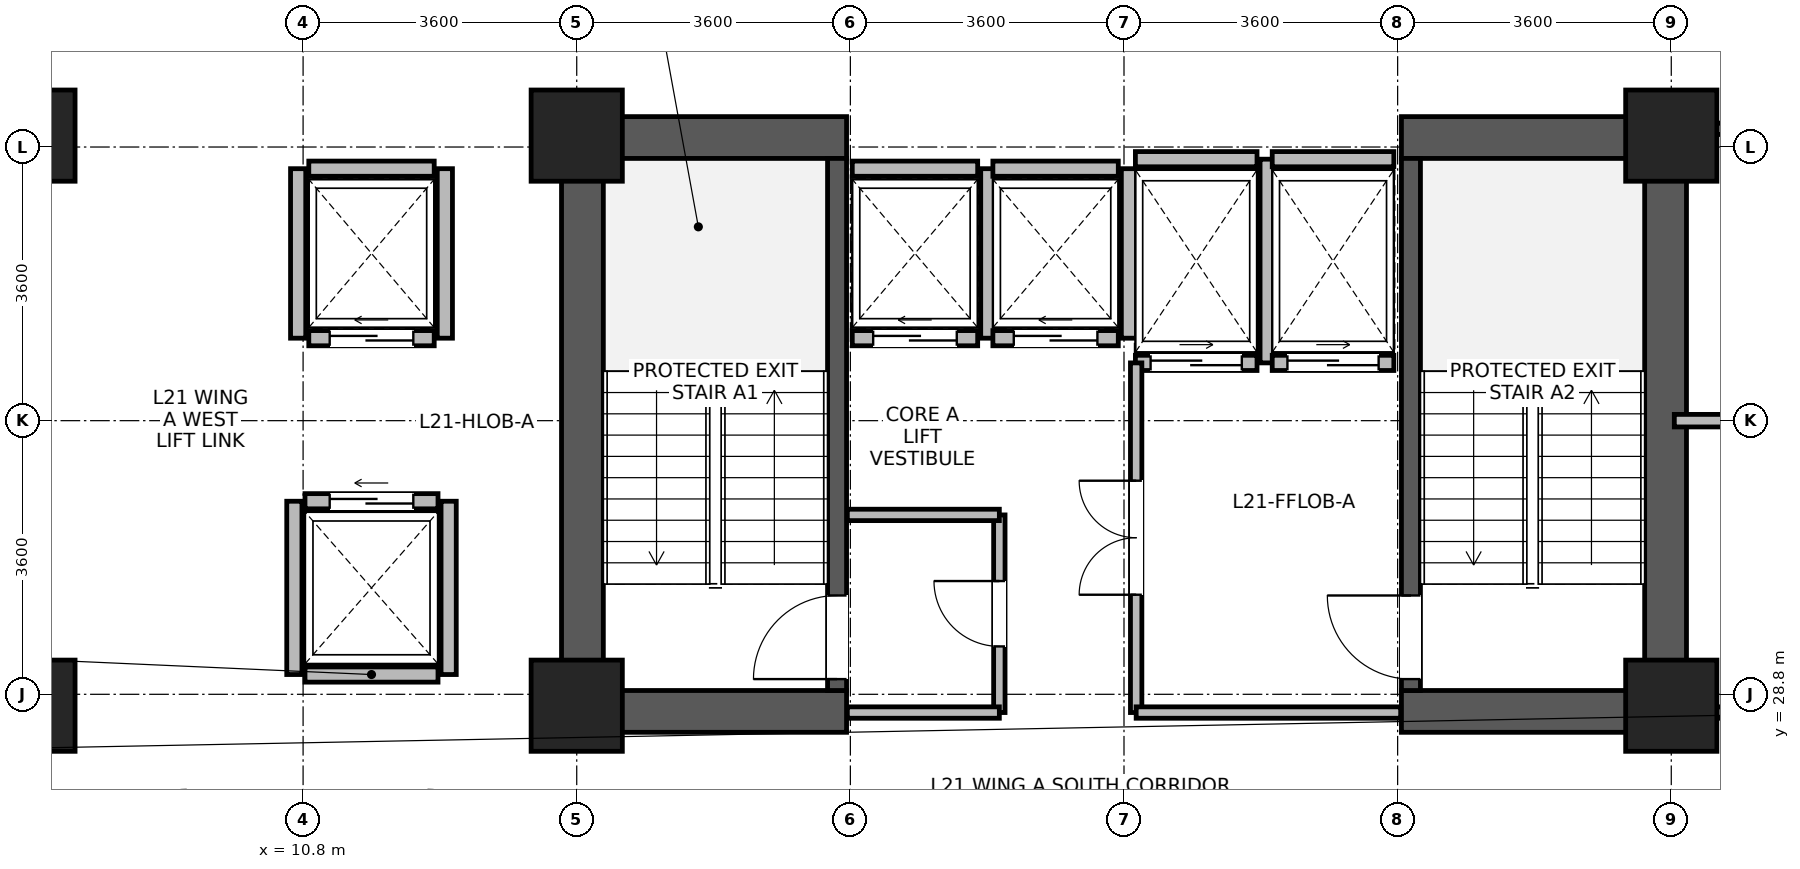
"""IFC4 building model, lengths in metres.
Left out: names, types, materials, properties, quantities, classifications, styles, units other than length and angle.
Written with IfcOpenShell. Run it as: python <this file> out.ifc"""

import sys

from ifc_helpers import new_model, si_unit, direction, frame, frame_2d, origin, origin_2d, place, context, subcontext, project, spatial, rectangle, extrude, source, transform, mapped, element, fill, save


model = new_model("IFC4")
c1 = context("Model", 3, precision=1e-05, world=origin(), true_north=direction((0.0, 1.0)))
c2 = subcontext(c1, "Body", "Model", "MODEL_VIEW")
j1 = project(units=[si_unit("LENGTHUNIT", "METRE"), si_unit("PLANEANGLEUNIT", "RADIAN")], contexts=[c1])
p1 = place(None, origin())
s1 = spatial("IfcSite", under=j1, at=p1, CompositionType="ELEMENT")
p2 = place(p1, origin())
s2 = spatial("IfcBuilding", under=s1, at=p2, CompositionType="ELEMENT")
p3 = place(p2, frame((0.0, 0.0, 86.0)))
s3 = spatial("IfcBuildingStorey", under=s2, at=p3, CompositionType="ELEMENT", Elevation=86.0)
for number, where, z_axis, x_axis in (
    (1, (14.475, 28.3, 0.0), (0.0, 0.0, 1.0), (0.0, 1.0, 0.0)),
    (2, (28.725, 28.3, 0.0), (0.0, 0.0, 1.0), (0.0, 1.0, 0.0)),
):
    element("IfcWall", number, at=place(p3, frame(where, z_axis=z_axis, x_axis=x_axis)), inside=s3, PredefinedType="SHEAR", context=c2, shape_type="SweptSolid", body=[
        extrude(rectangle(XDim=8.1, YDim=0.55, at=frame_2d((4.05, 0.0))), origin(), (0.0, 0.0, 1.0), 3.45),
    ])
for number, where, z_axis, x_axis in (
    (3, (14.75, 28.575, 0.0), (0.0, 0.0, 1.0), (1.0, 0.0, 0.0)),
    (4, (25.25, 28.575, 0.0), (0.0, 0.0, 1.0), (1.0, 0.0, 0.0)),
    (5, (14.75, 36.125, 0.0), (0.0, 0.0, 1.0), (1.0, 0.0, 0.0)),
    (6, (25.25, 36.125, 0.0), (0.0, 0.0, 1.0), (1.0, 0.0, 0.0)),
):
    element("IfcWall", number, at=place(p3, frame(where, z_axis=z_axis, x_axis=x_axis)), inside=s3, PredefinedType="SHEAR", context=c2, shape_type="SweptSolid", body=[
        extrude(rectangle(XDim=3.2, YDim=0.55, at=frame_2d((1.6, 0.0))), origin(), (0.0, 0.0, 1.0), 3.45),
    ])
p4 = place(p3, frame((17.825, 28.85, 0.0), z_axis=(0.0, 0.0, 1.0), x_axis=(0.0, 1.0, 0.0)))
e7 = element("IfcWall", 7, at=p4, inside=s3, PredefinedType="SHEAR", context=c2, shape_type="SweptSolid", body=[
    extrude(rectangle(XDim=7.0, YDim=0.25, at=frame_2d((3.5, 0.0))), origin(), (0.0, 0.0, 1.0), 3.45),
])
p5 = place(p4, frame((0.15, 0.0, 0.0)))
e8 = element("IfcOpeningElement", 8, at=p5, cuts=e7, PredefinedType="OPENING", context=c2, shape_type="SweptSolid", body=[
    extrude(rectangle(XDim=1.1, YDim=2.08, at=frame_2d((0.55, 1.04))), frame((0.0, 0.135, 0.0), z_axis=(0.0, -1.0, 0.0), x_axis=(1.0, 0.0, 0.0)), (0.0, 0.0, 1.0), 0.27),
])
p6 = place(p3, frame((25.375, 28.85, 0.0), z_axis=(0.0, 0.0, 1.0), x_axis=(0.0, 1.0, 0.0)))
e9 = element("IfcWall", 9, at=p6, inside=s3, PredefinedType="SHEAR", context=c2, shape_type="SweptSolid", body=[
    extrude(rectangle(XDim=7.0, YDim=0.25, at=frame_2d((3.5, 0.0))), origin(), (0.0, 0.0, 1.0), 3.45),
])
p7 = place(p6, frame((0.15, 0.0, 0.0)))
e10 = element("IfcOpeningElement", 10, at=p7, cuts=e9, PredefinedType="OPENING", context=c2, shape_type="SweptSolid", body=[
    extrude(rectangle(XDim=1.1, YDim=2.08, at=frame_2d((0.55, 1.04))), frame((0.0, 0.135, 0.0), z_axis=(0.0, -1.0, 0.0), x_axis=(1.0, 0.0, 0.0)), (0.0, 0.0, 1.0), 0.27),
])
m1 = source(origin(), c2, "Body", "SweptSolid", [
    extrude(rectangle(XDim=1.2, YDim=1.2, at=origin_2d()), origin(), (0.0, 0.0, 1.0), 3.7),
])
for number, where, z_axis, x_axis in (
    (11, (7.2, 28.65, 0.0), (0.0, 0.0, 1.0), (1.0, 0.0, 0.0)),
    (12, (7.2, 36.15, 0.0), (0.0, 0.0, 1.0), (1.0, 0.0, 0.0)),
    (13, (14.4, 28.65, 0.0), (0.0, 0.0, 1.0), (1.0, 0.0, 0.0)),
    (14, (14.4, 36.15, 0.0), (0.0, 0.0, 1.0), (1.0, 0.0, 0.0)),
    (15, (28.8, 28.65, 0.0), (0.0, 0.0, 1.0), (1.0, 0.0, 0.0)),
    (16, (28.8, 36.15, 0.0), (0.0, 0.0, 1.0), (1.0, 0.0, 0.0)),
):
    element("IfcColumn", number, at=place(p3, frame(where, z_axis=z_axis, x_axis=x_axis)), inside=s3, PredefinedType="COLUMN", context=c2, shape_type="MappedRepresentation", body=[
        mapped(m1, transform((0.0, 0.0, 0.0), x_axis=(1.0, 0.0, 0.0), y_axis=(0.0, 1.0, 0.0), z_axis=(0.0, 0.0, 1.0), scale=1.0)),
    ])
p8 = place(p3, frame((18.025, 33.485, 0.0), z_axis=(0.0, 0.0, 1.0), x_axis=(1.0, 0.0, 0.0)))
e17 = element("IfcWall", 17, at=p8, inside=s3, PredefinedType="PARTITIONING", context=c2, shape_type="SweptSolid", body=[
    extrude(rectangle(XDim=1.65, YDim=0.2, at=frame_2d((0.825, 0.0))), origin(), (0.0, 0.0, 1.0), 3.43),
])
p9 = place(p8, frame((0.275, 0.0, 0.0)))
e18 = element("IfcOpeningElement", 18, at=p9, cuts=e17, PredefinedType="OPENING", context=c2, shape_type="SweptSolid", body=[
    extrude(rectangle(XDim=1.1, YDim=2.12, at=frame_2d((0.55, 1.06))), frame((0.0, 0.11, 0.0), z_axis=(0.0, -1.0, 0.0), x_axis=(1.0, 0.0, 0.0)), (0.0, 0.0, 1.0), 0.22),
])
p10 = place(p3, frame((18.025, 35.715, 0.0), z_axis=(0.0, 0.0, 1.0), x_axis=(1.0, 0.0, 0.0)))
e19 = element("IfcWall", 19, at=p10, inside=s3, PredefinedType="PARTITIONING", context=c2, shape_type="SweptSolid", body=[
    extrude(rectangle(XDim=1.65, YDim=0.2, at=frame_2d((0.825, 0.0))), origin(), (0.0, 0.0, 1.0), 2.23),
])
p11 = place(p3, frame((19.815, 33.485, 0.0), z_axis=(0.0, 0.0, 1.0), x_axis=(0.0, 1.0, 0.0)))
e20 = element("IfcWall", 20, at=p11, inside=s3, PredefinedType="PARTITIONING", context=c2, shape_type="SweptSolid", body=[
    extrude(rectangle(XDim=2.23, YDim=0.2, at=frame_2d((1.115, 0.0))), origin(), (0.0, 0.0, 1.0), 3.43),
])
p12 = place(p3, frame((19.875, 33.485, 0.0), z_axis=(0.0, 0.0, 1.0), x_axis=(1.0, 0.0, 0.0)))
e21 = element("IfcWall", 21, at=p12, inside=s3, PredefinedType="PARTITIONING", context=c2, shape_type="SweptSolid", body=[
    extrude(rectangle(XDim=1.65, YDim=0.2, at=frame_2d((0.825, 0.0))), origin(), (0.0, 0.0, 1.0), 3.43),
])
p13 = place(p12, frame((0.275, 0.0, 0.0)))
e22 = element("IfcOpeningElement", 22, at=p13, cuts=e21, PredefinedType="OPENING", context=c2, shape_type="SweptSolid", body=[
    extrude(rectangle(XDim=1.1, YDim=2.12, at=frame_2d((0.55, 1.06))), frame((0.0, 0.11, 0.0), z_axis=(0.0, -1.0, 0.0), x_axis=(1.0, 0.0, 0.0)), (0.0, 0.0, 1.0), 0.22),
])
p14 = place(p3, frame((19.875, 35.715, 0.0), z_axis=(0.0, 0.0, 1.0), x_axis=(1.0, 0.0, 0.0)))
e23 = element("IfcWall", 23, at=p14, inside=s3, PredefinedType="PARTITIONING", context=c2, shape_type="SweptSolid", body=[
    extrude(rectangle(XDim=1.65, YDim=0.2, at=frame_2d((0.825, 0.0))), origin(), (0.0, 0.0, 1.0), 2.23),
])
p15 = place(p3, frame((21.665, 33.485, 0.0), z_axis=(0.0, 0.0, 1.0), x_axis=(0.0, 1.0, 0.0)))
e24 = element("IfcWall", 24, at=p15, inside=s3, PredefinedType="PARTITIONING", context=c2, shape_type="SweptSolid", body=[
    extrude(rectangle(XDim=2.23, YDim=0.2, at=frame_2d((1.115, 0.0))), origin(), (0.0, 0.0, 1.0), 3.43),
])
p16 = place(p3, frame((10.825, 29.06, 0.0), z_axis=(0.0, 0.0, 1.0), x_axis=(1.0, 0.0, 0.0)))
e25 = element("IfcWall", 25, at=p16, inside=s3, PredefinedType="PARTITIONING", context=c2, shape_type="SweptSolid", body=[
    extrude(rectangle(XDim=1.75, YDim=0.2, at=frame_2d((0.875, 0.0))), origin(), (0.0, 0.0, 1.0), 3.43),
])
p17 = place(p3, frame((10.825, 31.34, 0.0), z_axis=(0.0, 0.0, 1.0), x_axis=(1.0, 0.0, 0.0)))
e26 = element("IfcWall", 26, at=p17, inside=s3, PredefinedType="PARTITIONING", context=c2, shape_type="SweptSolid", body=[
    extrude(rectangle(XDim=1.75, YDim=0.2, at=frame_2d((0.875, 0.0))), origin(), (0.0, 0.0, 1.0), 3.43),
])
p18 = place(p17, frame((0.325, 0.0, 0.0)))
e27 = element("IfcOpeningElement", 27, at=p18, cuts=e26, PredefinedType="OPENING", context=c2, shape_type="SweptSolid", body=[
    extrude(rectangle(XDim=1.1, YDim=2.12, at=frame_2d((0.55, 1.06))), frame((0.0, 0.11, 0.0), z_axis=(0.0, -1.0, 0.0), x_axis=(1.0, 0.0, 0.0)), (0.0, 0.0, 1.0), 0.22),
])
for number, where, z_axis, x_axis in (
    (28, (10.685, 29.06, 0.0), (0.0, 0.0, 1.0), (0.0, 1.0, 0.0)),
    (29, (12.715, 29.06, 0.0), (0.0, 0.0, 1.0), (0.0, 1.0, 0.0)),
):
    element("IfcWall", number, at=place(p3, frame(where, z_axis=z_axis, x_axis=x_axis)), inside=s3, PredefinedType="PARTITIONING", context=c2, shape_type="SweptSolid", body=[
        extrude(rectangle(XDim=2.28, YDim=0.2, at=frame_2d((1.14, 0.0))), origin(), (0.0, 0.0, 1.0), 3.43),
    ])
p19 = place(p3, frame((10.875, 33.485, 0.0), z_axis=(0.0, 0.0, 1.0), x_axis=(1.0, 0.0, 0.0)))
e30 = element("IfcWall", 30, at=p19, inside=s3, PredefinedType="PARTITIONING", context=c2, shape_type="SweptSolid", body=[
    extrude(rectangle(XDim=1.65, YDim=0.2, at=frame_2d((0.825, 0.0))), origin(), (0.0, 0.0, 1.0), 3.43),
])
p20 = place(p19, frame((0.275, 0.0, 0.0)))
e31 = element("IfcOpeningElement", 31, at=p20, cuts=e30, PredefinedType="OPENING", context=c2, shape_type="SweptSolid", body=[
    extrude(rectangle(XDim=1.1, YDim=2.12, at=frame_2d((0.55, 1.06))), frame((0.0, 0.11, 0.0), z_axis=(0.0, -1.0, 0.0), x_axis=(1.0, 0.0, 0.0)), (0.0, 0.0, 1.0), 0.22),
])
p21 = place(p3, frame((10.875, 35.715, 0.0), z_axis=(0.0, 0.0, 1.0), x_axis=(1.0, 0.0, 0.0)))
e32 = element("IfcWall", 32, at=p21, inside=s3, PredefinedType="PARTITIONING", context=c2, shape_type="SweptSolid", body=[
    extrude(rectangle(XDim=1.65, YDim=0.2, at=frame_2d((0.825, 0.0))), origin(), (0.0, 0.0, 1.0), 3.43),
])
for number, where, z_axis, x_axis in (
    (33, (10.735, 33.485, 0.0), (0.0, 0.0, 1.0), (0.0, 1.0, 0.0)),
    (34, (12.665, 33.485, 0.0), (0.0, 0.0, 1.0), (0.0, 1.0, 0.0)),
):
    element("IfcWall", number, at=place(p3, frame(where, z_axis=z_axis, x_axis=x_axis)), inside=s3, PredefinedType="PARTITIONING", context=c2, shape_type="SweptSolid", body=[
        extrude(rectangle(XDim=2.23, YDim=0.2, at=frame_2d((1.115, 0.0))), origin(), (0.0, 0.0, 1.0), 3.43),
    ])
p22 = place(p3, frame((21.75, 33.16, 0.0), z_axis=(0.0, 0.0, 1.0), x_axis=(1.0, 0.0, 0.0)))
e35 = element("IfcWall", 35, at=p22, inside=s3, PredefinedType="PARTITIONING", context=c2, shape_type="SweptSolid", body=[
    extrude(rectangle(XDim=1.6, YDim=0.2, at=frame_2d((0.8, 0.0))), origin(), (0.0, 0.0, 1.0), 3.43),
])
p23 = place(p22, frame((0.2, 0.0, 0.0)))
e36 = element("IfcOpeningElement", 36, at=p23, cuts=e35, PredefinedType="OPENING", context=c2, shape_type="SweptSolid", body=[
    extrude(rectangle(XDim=1.2, YDim=2.12, at=frame_2d((0.6, 1.06))), frame((0.0, 0.11, 0.0), z_axis=(0.0, -1.0, 0.0), x_axis=(1.0, 0.0, 0.0)), (0.0, 0.0, 1.0), 0.22),
])
p24 = place(p3, frame((21.75, 35.84, 0.0), z_axis=(0.0, 0.0, 1.0), x_axis=(1.0, 0.0, 0.0)))
e37 = element("IfcWall", 37, at=p24, inside=s3, PredefinedType="PARTITIONING", context=c2, shape_type="SweptSolid", body=[
    extrude(rectangle(XDim=1.6, YDim=0.2, at=frame_2d((0.8, 0.0))), origin(), (0.0, 0.0, 1.0), 2.23),
])
p25 = place(p3, frame((23.49, 33.16, 0.0), z_axis=(0.0, 0.0, 1.0), x_axis=(0.0, 1.0, 0.0)))
e38 = element("IfcWall", 38, at=p25, inside=s3, PredefinedType="PARTITIONING", context=c2, shape_type="SweptSolid", body=[
    extrude(rectangle(XDim=2.68, YDim=0.2, at=frame_2d((1.34, 0.0))), origin(), (0.0, 0.0, 1.0), 3.43),
])
p26 = place(p3, frame((23.55, 33.16, 0.0), z_axis=(0.0, 0.0, 1.0), x_axis=(1.0, 0.0, 0.0)))
e39 = element("IfcWall", 39, at=p26, inside=s3, PredefinedType="PARTITIONING", context=c2, shape_type="SweptSolid", body=[
    extrude(rectangle(XDim=1.6, YDim=0.2, at=frame_2d((0.8, 0.0))), origin(), (0.0, 0.0, 1.0), 3.43),
])
p27 = place(p26, frame((0.2, 0.0, 0.0)))
e40 = element("IfcOpeningElement", 40, at=p27, cuts=e39, PredefinedType="OPENING", context=c2, shape_type="SweptSolid", body=[
    extrude(rectangle(XDim=1.2, YDim=2.12, at=frame_2d((0.6, 1.06))), frame((0.0, 0.11, 0.0), z_axis=(0.0, -1.0, 0.0), x_axis=(1.0, 0.0, 0.0)), (0.0, 0.0, 1.0), 0.22),
])
p28 = place(p3, frame((23.55, 35.84, 0.0), z_axis=(0.0, 0.0, 1.0), x_axis=(1.0, 0.0, 0.0)))
e41 = element("IfcWall", 41, at=p28, inside=s3, PredefinedType="PARTITIONING", context=c2, shape_type="SweptSolid", body=[
    extrude(rectangle(XDim=1.6, YDim=0.2, at=frame_2d((0.8, 0.0))), origin(), (0.0, 0.0, 1.0), 2.23),
])
p29 = place(p3, frame((29.4, 28.56, 0.0), z_axis=(0.0, 0.0, 1.0), x_axis=(1.0, 0.0, 0.0)))
e42 = element("IfcWall", 42, at=p29, inside=s3, PredefinedType="PARTITIONING", context=c2, shape_type="SweptSolid", body=[
    extrude(rectangle(XDim=3.96, YDim=0.15, at=frame_2d((1.98, 0.0))), origin(), (0.0, 0.0, 1.0), 2.78),
])
p30 = place(p29, frame((1.55, 0.0, 0.0)))
e43 = element("IfcOpeningElement", 43, at=p30, cuts=e42, PredefinedType="OPENING", context=c2, shape_type="SweptSolid", body=[
    extrude(rectangle(XDim=0.86, YDim=2.02, at=frame_2d((0.43, 1.01))), frame((0.0, 0.085, 0.0), z_axis=(0.0, -1.0, 0.0), x_axis=(1.0, 0.0, 0.0)), (0.0, 0.0, 1.0), 0.17),
])
p31 = place(p3, frame((29.4, 36.24, 0.0), z_axis=(0.0, 0.0, 1.0), x_axis=(1.0, 0.0, 0.0)))
e44 = element("IfcWall", 44, at=p31, inside=s3, PredefinedType="PARTITIONING", context=c2, shape_type="SweptSolid", body=[
    extrude(rectangle(XDim=3.96, YDim=0.15, at=frame_2d((1.98, 0.0))), origin(), (0.0, 0.0, 1.0), 2.78),
])
p32 = place(p31, frame((1.33, 0.0, 0.0)))
e45 = element("IfcOpeningElement", 45, at=p32, cuts=e44, PredefinedType="OPENING", context=c2, shape_type="SweptSolid", body=[
    extrude(rectangle(XDim=1.3, YDim=2.12, at=frame_2d((0.65, 1.06))), frame((0.0, 0.085, 0.0), z_axis=(0.0, -1.0, 0.0), x_axis=(1.0, 0.0, 0.0)), (0.0, 0.0, 1.0), 0.17),
])
p33 = place(p3, frame((19.96, 28.56, 0.0), z_axis=(0.0, 0.0, 1.0), x_axis=(0.0, 1.0, 0.0)))
e46 = element("IfcWall", 46, at=p33, inside=s3, PredefinedType="PARTITIONING", context=c2, shape_type="SweptSolid", body=[
    extrude(rectangle(XDim=2.6, YDim=0.15, at=frame_2d((1.3, 0.0))), origin(), (0.0, 0.0, 1.0), 3.43),
])
p34 = place(p33, frame((0.87, 0.0, 0.0)))
e47 = element("IfcOpeningElement", 47, at=p34, cuts=e46, PredefinedType="OPENING", context=c2, shape_type="SweptSolid", body=[
    extrude(rectangle(XDim=0.86, YDim=2.02, at=frame_2d((0.43, 1.01))), frame((0.0, 0.085, 0.0), z_axis=(0.0, -1.0, 0.0), x_axis=(1.0, 0.0, 0.0)), (0.0, 0.0, 1.0), 0.17),
])
p35 = place(p3, frame((17.96, 28.56, 0.0), z_axis=(0.0, 0.0, 1.0), x_axis=(1.0, 0.0, 0.0)))
e48 = element("IfcWall", 48, at=p35, inside=s3, PredefinedType="PARTITIONING", context=c2, shape_type="SweptSolid", body=[
    extrude(rectangle(XDim=2.0, YDim=0.15, at=frame_2d((1.0, 0.0))), origin(), (0.0, 0.0, 1.0), 2.23),
])
p36 = place(p3, frame((17.96, 31.16, 0.0), z_axis=(0.0, 0.0, 1.0), x_axis=(1.0, 0.0, 0.0)))
e49 = element("IfcWall", 49, at=p36, inside=s3, PredefinedType="PARTITIONING", context=c2, shape_type="SweptSolid", body=[
    extrude(rectangle(XDim=2.0, YDim=0.15, at=frame_2d((1.0, 0.0))), origin(), (0.0, 0.0, 1.0), 3.43),
])
p37 = place(p3, frame((21.76, 28.56, 0.0), z_axis=(0.0, 0.0, 1.0), x_axis=(0.0, 1.0, 0.0)))
e50 = element("IfcWall", 50, at=p37, inside=s3, PredefinedType="PARTITIONING", context=c2, shape_type="SweptSolid", body=[
    extrude(rectangle(XDim=4.6, YDim=0.15, at=frame_2d((2.3, 0.0))), origin(), (0.0, 0.0, 1.0), 3.43),
])
p38 = place(p37, frame((1.55, 0.0, 0.0)))
e51 = element("IfcOpeningElement", 51, at=p38, cuts=e50, PredefinedType="OPENING", context=c2, shape_type="SweptSolid", body=[
    extrude(rectangle(XDim=1.5, YDim=2.1, at=frame_2d((0.75, 1.05))), frame((0.0, 0.085, 0.0), z_axis=(0.0, -1.0, 0.0), x_axis=(1.0, 0.0, 0.0)), (0.0, 0.0, 1.0), 0.17),
])
p39 = place(p3, frame((28.84, 32.4, 0.0), z_axis=(0.0, 0.0, 1.0), x_axis=(1.0, 0.0, 0.0)))
e52 = element("IfcWall", 52, at=p39, inside=s3, PredefinedType="PARTITIONING", context=c2, shape_type="SweptSolid", body=[
    extrude(rectangle(XDim=4.52, YDim=0.165, at=frame_2d((2.26, 0.0))), origin(), (0.0, 0.0, 1.0), 3.43),
])
p40 = place(p3, frame((21.76, 28.56, 0.0), z_axis=(0.0, 0.0, 1.0), x_axis=(1.0, 0.0, 0.0)))
e53 = element("IfcWall", 53, at=p40, inside=s3, PredefinedType="PARTITIONING", context=c2, shape_type="SweptSolid", body=[
    extrude(rectangle(XDim=3.48, YDim=0.15, at=frame_2d((1.74, 0.0))), origin(), (0.0, 0.0, 1.0), 2.23),
])
p41 = place(p5, origin())
e54 = element("IfcDoor", 54, at=p41, inside=s3, OperationType="SINGLE_SWING_LEFT", PredefinedType="DOOR", context=c2, shape_type="SweptSolid", body=[
    extrude(rectangle(XDim=1.1, YDim=2.08, at=frame_2d((0.55, 1.04))), frame((0.0, 0.025, 0.0), z_axis=(0.0, -1.0, 0.0), x_axis=(1.0, 0.0, 0.0)), (0.0, 0.0, 1.0), 0.05),
])
fill(e8, e54)
p42 = place(p7, origin())
e55 = element("IfcDoor", 55, at=p42, inside=s3, OperationType="SINGLE_SWING_RIGHT", PredefinedType="DOOR", context=c2, shape_type="SweptSolid", body=[
    extrude(rectangle(XDim=1.1, YDim=2.08, at=frame_2d((0.55, 1.04))), frame((0.0, 0.025, 0.0), z_axis=(0.0, -1.0, 0.0), x_axis=(1.0, 0.0, 0.0)), (0.0, 0.0, 1.0), 0.05),
])
fill(e10, e55)
p43 = place(p9, origin())
e56 = element("IfcDoor", 56, at=p43, inside=s3, OperationType="SLIDING_TO_LEFT", PredefinedType="DOOR", context=c2, shape_type="SweptSolid", body=[
    extrude(rectangle(XDim=1.1, YDim=2.12, at=frame_2d((0.55, 1.06))), frame((0.0, 0.025, 0.0), z_axis=(0.0, -1.0, 0.0), x_axis=(1.0, 0.0, 0.0)), (0.0, 0.0, 1.0), 0.05),
])
fill(e18, e56)
p44 = place(p13, origin())
e57 = element("IfcDoor", 57, at=p44, inside=s3, OperationType="SLIDING_TO_LEFT", PredefinedType="DOOR", context=c2, shape_type="SweptSolid", body=[
    extrude(rectangle(XDim=1.1, YDim=2.12, at=frame_2d((0.55, 1.06))), frame((0.0, 0.025, 0.0), z_axis=(0.0, -1.0, 0.0), x_axis=(1.0, 0.0, 0.0)), (0.0, 0.0, 1.0), 0.05),
])
fill(e22, e57)
p45 = place(p18, origin())
e58 = element("IfcDoor", 58, at=p45, inside=s3, OperationType="SLIDING_TO_LEFT", PredefinedType="DOOR", context=c2, shape_type="SweptSolid", body=[
    extrude(rectangle(XDim=1.1, YDim=2.12, at=frame_2d((0.55, 1.06))), frame((0.0, 0.025, 0.0), z_axis=(0.0, -1.0, 0.0), x_axis=(1.0, 0.0, 0.0)), (0.0, 0.0, 1.0), 0.05),
])
fill(e27, e58)
p46 = place(p20, origin())
e59 = element("IfcDoor", 59, at=p46, inside=s3, OperationType="SLIDING_TO_LEFT", PredefinedType="DOOR", context=c2, shape_type="SweptSolid", body=[
    extrude(rectangle(XDim=1.1, YDim=2.12, at=frame_2d((0.55, 1.06))), frame((0.0, 0.025, 0.0), z_axis=(0.0, -1.0, 0.0), x_axis=(1.0, 0.0, 0.0)), (0.0, 0.0, 1.0), 0.05),
])
fill(e31, e59)
p47 = place(p23, origin())
e60 = element("IfcDoor", 60, at=p47, inside=s3, OperationType="SLIDING_TO_RIGHT", PredefinedType="DOOR", context=c2, shape_type="SweptSolid", body=[
    extrude(rectangle(XDim=1.2, YDim=2.12, at=frame_2d((0.6, 1.06))), frame((0.0, 0.025, 0.0), z_axis=(0.0, -1.0, 0.0), x_axis=(1.0, 0.0, 0.0)), (0.0, 0.0, 1.0), 0.05),
])
fill(e36, e60)
p48 = place(p27, origin())
e61 = element("IfcDoor", 61, at=p48, inside=s3, OperationType="SLIDING_TO_RIGHT", PredefinedType="DOOR", context=c2, shape_type="SweptSolid", body=[
    extrude(rectangle(XDim=1.2, YDim=2.12, at=frame_2d((0.6, 1.06))), frame((0.0, 0.025, 0.0), z_axis=(0.0, -1.0, 0.0), x_axis=(1.0, 0.0, 0.0)), (0.0, 0.0, 1.0), 0.05),
])
fill(e40, e61)
p49 = place(p34, origin())
e62 = element("IfcDoor", 62, at=p49, inside=s3, OperationType="SINGLE_SWING_RIGHT", PredefinedType="DOOR", context=c2, shape_type="SweptSolid", body=[
    extrude(rectangle(XDim=0.86, YDim=2.02, at=frame_2d((0.43, 1.01))), frame((0.0, 0.025, 0.0), z_axis=(0.0, -1.0, 0.0), x_axis=(1.0, 0.0, 0.0)), (0.0, 0.0, 1.0), 0.05),
])
fill(e47, e62)
p50 = place(p38, origin())
e63 = element("IfcDoor", 63, at=p50, inside=s3, OperationType="DOUBLE_DOOR_SINGLE_SWING", PredefinedType="DOOR", context=c2, shape_type="SweptSolid", body=[
    extrude(rectangle(XDim=1.5, YDim=2.1, at=frame_2d((0.75, 1.05))), frame((0.0, 0.025, 0.0), z_axis=(0.0, -1.0, 0.0), x_axis=(1.0, 0.0, 0.0)), (0.0, 0.0, 1.0), 0.05),
])
fill(e51, e63)
save(model, sys.argv[1])
